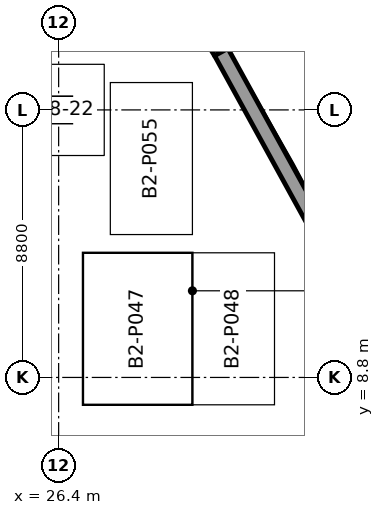
"""IFC4 building model, lengths in metres.
Left out: names, types, materials, properties, quantities, classifications, styles, units other than length and angle.
Written with IfcOpenShell. Run it as: python <this file> out.ifc"""

import sys

from ifc_helpers import new_model, si_unit, direction, frame, frame_2d, origin, origin_2d, place, context, subcontext, project, spatial, rectangle, extrude, element, save


model = new_model("IFC4")
c1 = context("Model", 3, precision=1e-05, world=origin(), true_north=direction((0.0, 1.0)))
c2 = subcontext(c1, "Body", "Model", "MODEL_VIEW")
j1 = project(units=[si_unit("LENGTHUNIT", "METRE"), si_unit("PLANEANGLEUNIT", "RADIAN")], contexts=[c1])
p1 = place(None, origin())
s1 = spatial("IfcSite", under=j1, at=p1, CompositionType="ELEMENT")
p2 = place(p1, origin())
s2 = spatial("IfcBuilding", under=s1, at=p2, CompositionType="ELEMENT")
p3 = place(p2, frame((0.0, 0.0, -9.0)))
s3 = spatial("IfcBuildingStorey", under=s2, at=p3, CompositionType="ELEMENT", Elevation=-9.0)
p4 = place(p3, frame((26.4, 17.6, 0.0), z_axis=(0.0, 0.0, 1.0), x_axis=(1.0, 0.0, 0.0)))
e1 = element("IfcColumn", 1, at=p4, inside=s3, PredefinedType="COLUMN", context=c2, shape_type="SweptSolid", body=[
    extrude(rectangle(XDim=0.8, YDim=0.8, at=origin_2d()), origin(), (0.0, 0.0, 1.0), 4.5),
])
p5 = place(p3, frame((27.193, 26.814, 0.0), z_axis=(0.0, 0.0, 1.0), x_axis=(0.528818922836, -0.848734674, 0.0)))
e2 = element("IfcWall", 2, at=p5, inside=s3, PredefinedType="SOLIDWALL", context=c2, shape_type="SweptSolid", body=[
    extrude(rectangle(XDim=8.614, YDim=0.5, at=frame_2d((4.307, 0.0))), origin(), (0.0, 0.0, 1.0), 4.5),
])
p6 = place(p3, frame((31.748, 19.503, 0.0), z_axis=(0.0, 0.0, 1.0), x_axis=(0.481899167074, -0.876226678876, 0.0)))
e3 = element("IfcWall", 3, at=p6, inside=s3, PredefinedType="SOLIDWALL", context=c2, shape_type="SweptSolid", body=[
    extrude(rectangle(XDim=8.615, YDim=0.5, at=frame_2d((4.307, 0.0))), origin(), (0.0, 0.0, 1.0), 4.5),
])
save(model, sys.argv[1])
